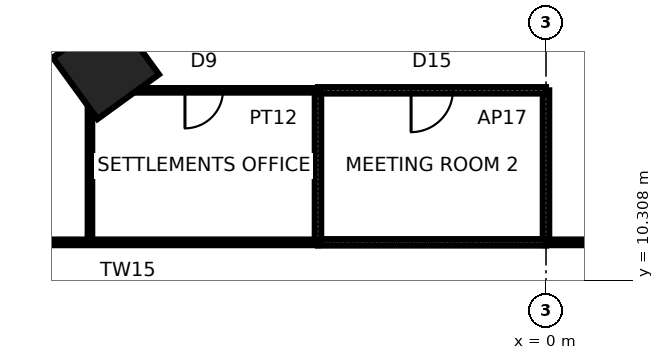
"""IFC4 building model, lengths in metres.
Left out: names, types, materials, properties, quantities, classifications, styles, units other than length and angle.
Written with IfcOpenShell. Run it as: python <this file> out.ifc"""

import sys

from ifc_helpers import new_model, si_unit, direction, frame, frame_2d, origin, origin_2d, place, context, subcontext, project, spatial, rectangle, extrude, element, fill, save


model = new_model("IFC4")
c1 = context("Model", 3, precision=1e-05, world=origin(), true_north=direction((0.0, 1.0)))
c2 = subcontext(c1, "Body", "Model", "MODEL_VIEW")
j1 = project(units=[si_unit("LENGTHUNIT", "METRE"), si_unit("PLANEANGLEUNIT", "RADIAN")], contexts=[c1])
p1 = place(None, origin())
s1 = spatial("IfcSite", under=j1, at=p1, CompositionType="ELEMENT")
p2 = place(p1, origin())
s2 = spatial("IfcBuilding", under=s1, at=p2, CompositionType="ELEMENT")
p3 = place(p2, frame((0.0, 0.0, 82.6)))
s3 = spatial("IfcBuildingStorey", under=s2, at=p3, CompositionType="ELEMENT", Elevation=82.6)
p4 = place(p3, frame((-11.581, 15.94, 0.0), z_axis=(0.0, 0.0, 1.0), x_axis=(-0.587785252292, 0.809016994375, 0.0)))
e1 = element("IfcColumn", 1, at=p4, inside=s3, PredefinedType="COLUMN", context=c2, shape_type="SweptSolid", body=[
    extrude(rectangle(XDim=2.0, YDim=2.0, at=origin_2d()), origin(), (0.0, 0.0, 1.0), 4.2),
])
p5 = place(p3, frame((9.0, 11.3, 0.0), z_axis=(0.0, 0.0, 1.0), x_axis=(-1.0, 0.0, 0.0)))
e2 = element("IfcWall", 2, at=p5, inside=s3, PredefinedType="PARTITIONING", context=c2, shape_type="SweptSolid", body=[
    extrude(rectangle(XDim=9.0, YDim=0.15, at=frame_2d((4.5, 0.0))), origin(), (0.0, 0.0, 1.0), 4.0),
])
p6 = place(p3, frame((0.0, 11.3, 0.0), z_axis=(0.0, 0.0, 1.0), x_axis=(0.0, 1.0, 0.0)))
e3 = element("IfcWall", 3, at=p6, inside=s3, PredefinedType="PARTITIONING", context=c2, shape_type="SweptSolid", body=[
    extrude(rectangle(XDim=4.0, YDim=0.17, at=frame_2d((2.0, 0.0))), origin(), (0.0, 0.0, 1.0), 2.8),
])
p7 = place(p3, frame((0.0, 15.3, 0.0), z_axis=(0.0, 0.0, 1.0), x_axis=(-1.0, 0.0, 0.0)))
e4 = element("IfcWall", 4, at=p7, inside=s3, PredefinedType="PARTITIONING", context=c2, shape_type="SweptSolid", body=[
    extrude(rectangle(XDim=6.0, YDim=0.17, at=frame_2d((3.0, 0.0))), origin(), (0.0, 0.0, 1.0), 3.467),
])
p8 = place(p7, frame((2.45, 0.0, 0.0)))
e5 = element("IfcOpeningElement", 5, at=p8, cuts=e4, PredefinedType="OPENING", context=c2, shape_type="SweptSolid", body=[
    extrude(rectangle(XDim=1.1, YDim=2.4, at=frame_2d((0.55, 1.2))), frame((0.0, 0.095, 0.0), z_axis=(0.0, -1.0, 0.0), x_axis=(1.0, 0.0, 0.0)), (0.0, 0.0, 1.0), 0.19),
])
p9 = place(p3, frame((-6.0, 11.3, 0.0), z_axis=(0.0, 0.0, 1.0), x_axis=(1.0, 0.0, 0.0)))
e6 = element("IfcWall", 6, at=p9, inside=s3, PredefinedType="PARTITIONING", context=c2, shape_type="SweptSolid", body=[
    extrude(rectangle(XDim=6.0, YDim=0.17, at=frame_2d((3.0, 0.0))), origin(), (0.0, 0.0, 1.0), 4.0),
])
p10 = place(p3, frame((-6.0, 15.3, 0.0), z_axis=(0.0, 0.0, 1.0), x_axis=(0.0, -1.0, 0.0)))
e7 = element("IfcWall", 7, at=p10, inside=s3, PredefinedType="PARTITIONING", context=c2, shape_type="SweptSolid", body=[
    extrude(rectangle(XDim=4.0, YDim=0.17, at=frame_2d((2.0, 0.0))), origin(), (0.0, 0.0, 1.0), 4.0),
])
p11 = place(p3, frame((-6.0, 15.3, 0.0), z_axis=(0.0, 0.0, 1.0), x_axis=(-1.0, 0.0, 0.0)))
e8 = element("IfcWall", 8, at=p11, inside=s3, PredefinedType="PARTITIONING", context=c2, shape_type="SweptSolid", body=[
    extrude(rectangle(XDim=6.0, YDim=0.12, at=frame_2d((3.0, 0.0))), origin(), (0.0, 0.0, 1.0), 4.0),
])
p12 = place(p11, frame((2.5, 0.0, 0.0)))
e9 = element("IfcOpeningElement", 9, at=p12, cuts=e8, PredefinedType="OPENING", context=c2, shape_type="SweptSolid", body=[
    extrude(rectangle(XDim=1.0, YDim=2.4, at=frame_2d((0.5, 1.2))), frame((0.0, 0.07, 0.0), z_axis=(0.0, -1.0, 0.0), x_axis=(1.0, 0.0, 0.0)), (0.0, 0.0, 1.0), 0.14),
])
p13 = place(p3, frame((-12.0, 15.3, 0.0), z_axis=(0.0, 0.0, 1.0), x_axis=(0.0, -1.0, 0.0)))
e10 = element("IfcWall", 10, at=p13, inside=s3, PredefinedType="PARTITIONING", context=c2, shape_type="SweptSolid", body=[
    extrude(rectangle(XDim=4.0, YDim=0.12, at=frame_2d((2.0, 0.0))), origin(), (0.0, 0.0, 1.0), 4.0),
])
p14 = place(p3, frame((-6.0, 11.3, 0.0), z_axis=(0.0, 0.0, 1.0), x_axis=(-1.0, 0.0, 0.0)))
e11 = element("IfcWall", 11, at=p14, inside=s3, PredefinedType="PARTITIONING", context=c2, shape_type="SweptSolid", body=[
    extrude(rectangle(XDim=10.0, YDim=0.15, at=frame_2d((5.0, 0.0))), origin(), (0.0, 0.0, 1.0), 4.0),
])
p15 = place(p12, origin())
e12 = element("IfcDoor", 12, at=p15, inside=s3, OperationType="SINGLE_SWING_RIGHT", PredefinedType="DOOR", context=c2, shape_type="SweptSolid", body=[
    extrude(rectangle(XDim=1.0, YDim=2.4, at=frame_2d((0.5, 1.2))), frame((0.0, 0.025, 0.0), z_axis=(0.0, -1.0, 0.0), x_axis=(1.0, 0.0, 0.0)), (0.0, 0.0, 1.0), 0.05),
])
fill(e9, e12)
p16 = place(p8, origin())
e13 = element("IfcDoor", 13, at=p16, inside=s3, OperationType="SINGLE_SWING_RIGHT", PredefinedType="DOOR", context=c2, shape_type="SweptSolid", body=[
    extrude(rectangle(XDim=1.1, YDim=2.4, at=frame_2d((0.55, 1.2))), frame((0.0, 0.025, 0.0), z_axis=(0.0, -1.0, 0.0), x_axis=(1.0, 0.0, 0.0)), (0.0, 0.0, 1.0), 0.05),
])
fill(e5, e13)
save(model, sys.argv[1])
